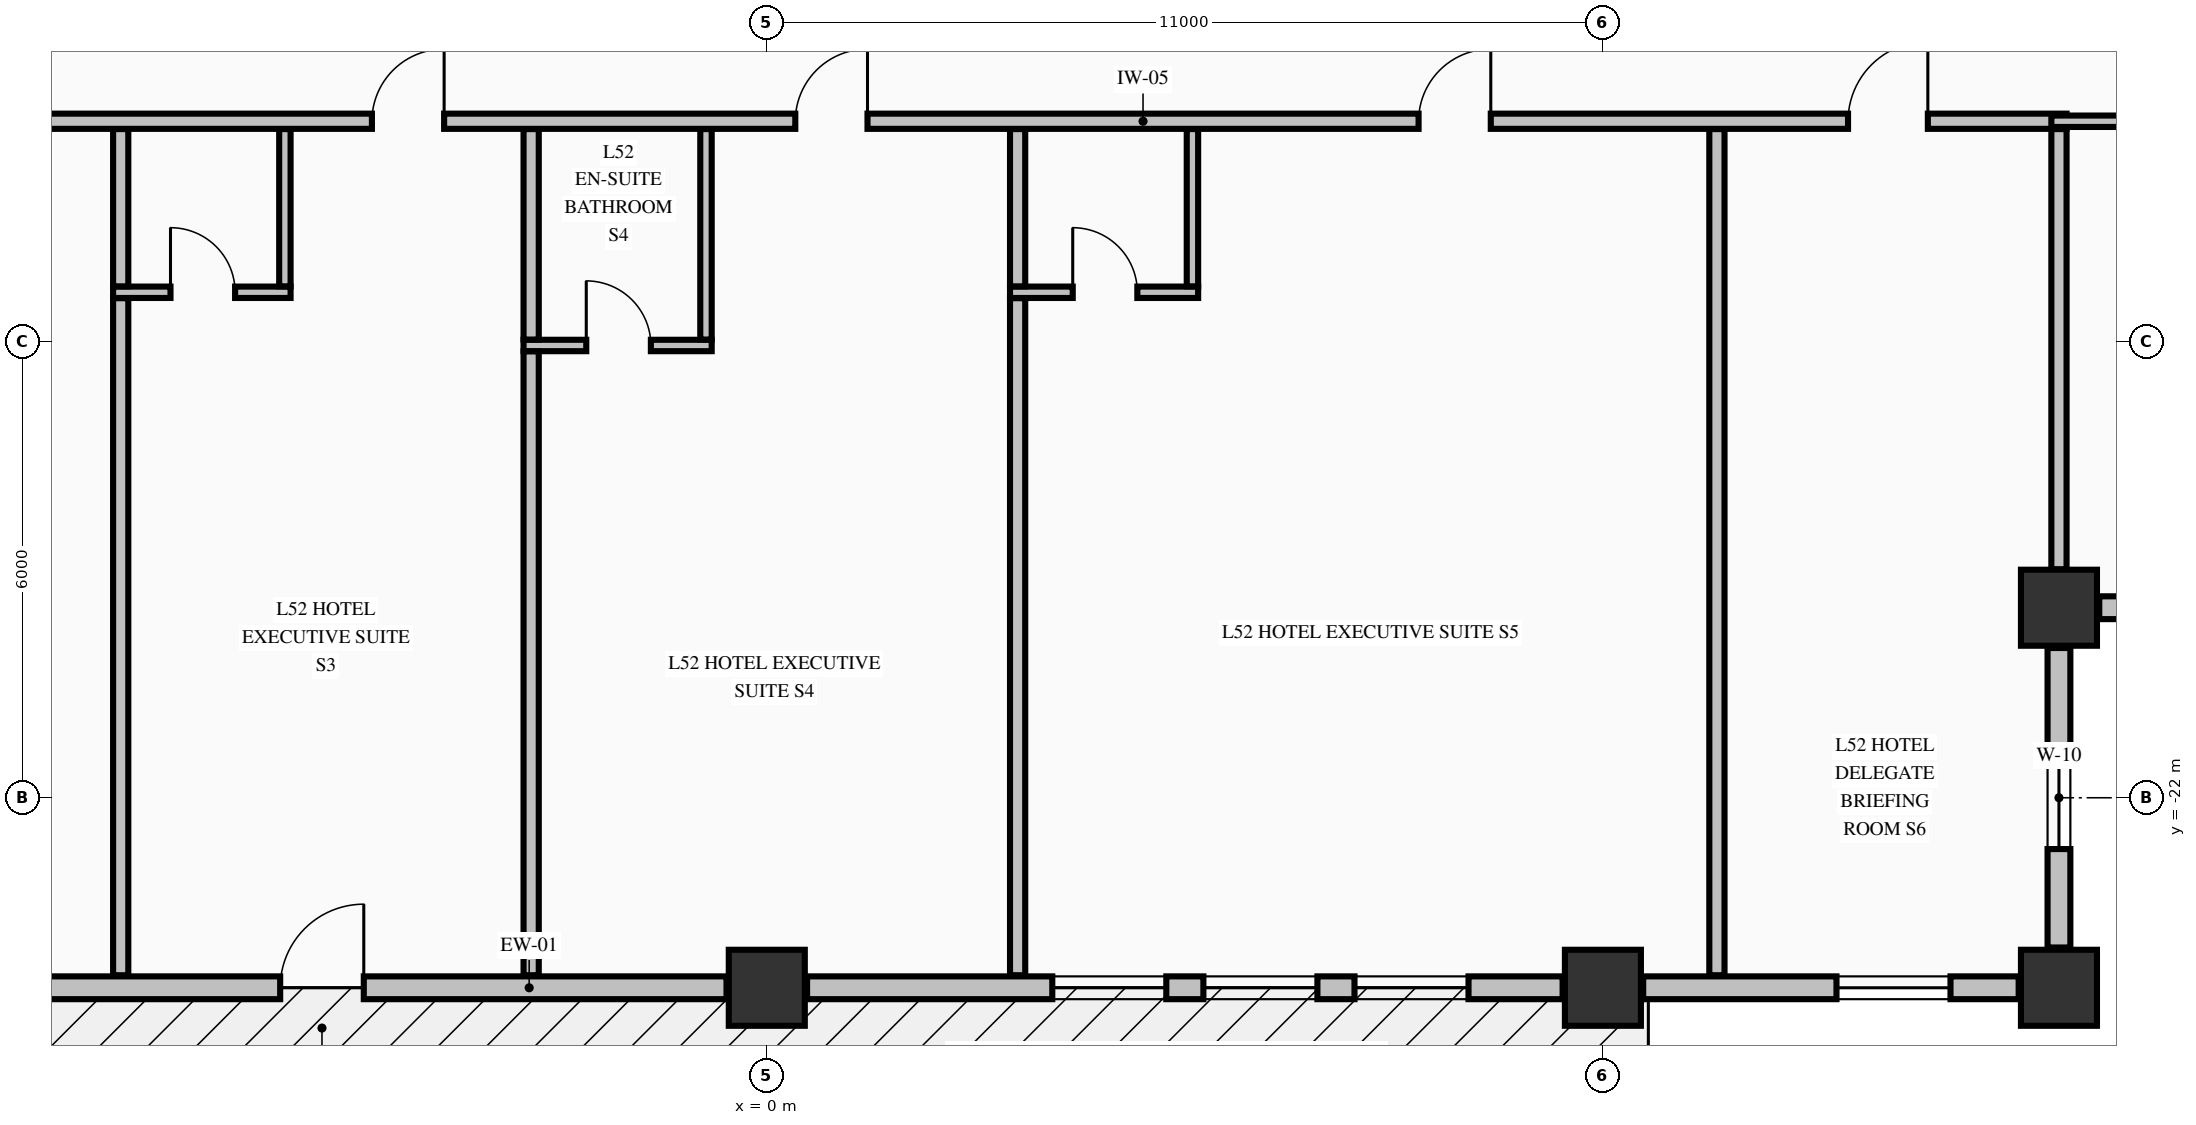
"""IFC4 building model, lengths in metres.
Left out: names, types, materials, properties, quantities, classifications, styles, units other than length and angle.
Written with IfcOpenShell. Run it as: python <this file> out.ifc"""

import sys

from ifc_helpers import new_model, si_unit, direction, frame, frame_2d, origin, origin_2d, place, context, subcontext, project, spatial, rectangle, extrude, element, fill, save


model = new_model("IFC4")
c1 = context("Model", 3, precision=1e-05, world=origin(), true_north=direction((0.0, 1.0)))
c2 = subcontext(c1, "Body", "Model", "MODEL_VIEW")
j1 = project(units=[si_unit("LENGTHUNIT", "METRE"), si_unit("PLANEANGLEUNIT", "RADIAN")], contexts=[c1])
p1 = place(None, origin())
s1 = spatial("IfcSite", under=j1, at=p1, CompositionType="ELEMENT")
p2 = place(p1, origin())
s2 = spatial("IfcBuilding", under=s1, at=p2, CompositionType="ELEMENT")
p3 = place(p2, frame((0.0, 0.0, 201.66)))
s3 = spatial("IfcBuildingStorey", under=s2, at=p3, CompositionType="ELEMENT", Elevation=201.66)
for number, where, z_axis, x_axis in (
    (1, (0.0, -24.5, -0.25), (0.0, 0.0, 1.0), (1.0, 0.0, 0.0)),
    (2, (11.0, -24.5, -0.25), (0.0, 0.0, 1.0), (1.0, 0.0, 0.0)),
    (3, (17.0, -24.5, -0.25), (0.0, 0.0, 1.0), (1.0, 0.0, 0.0)),
    (4, (17.0, -19.5, -0.25), (0.0, 0.0, 1.0), (1.0, 0.0, 0.0)),
):
    element("IfcColumn", number, at=place(p3, frame(where, z_axis=z_axis, x_axis=x_axis)), inside=s3, PredefinedType="COLUMN", context=c2, shape_type="SweptSolid", body=[
        extrude(rectangle(XDim=1.0, YDim=1.0, at=origin_2d()), origin(), (0.0, 0.0, 1.0), 3.4),
    ])
p4 = place(p3, frame((17.0, -23.97, 0.0), z_axis=(0.0, 0.0, 1.0), x_axis=(0.0, 1.0, 0.0)))
e5 = element("IfcWall", 5, at=p4, inside=s3, PredefinedType="STANDARD", context=c2, shape_type="SweptSolid", body=[
    extrude(rectangle(XDim=3.94, YDim=0.3, at=frame_2d((1.97, 0.0))), origin(), (0.0, 0.0, 1.0), 2.542),
])
p5 = place(p4, frame((1.295, 0.0, 0.68)))
e6 = element("IfcOpeningElement", 6, at=p5, cuts=e5, PredefinedType="OPENING", context=c2, shape_type="SweptSolid", body=[
    extrude(rectangle(XDim=1.35, YDim=1.42, at=frame_2d((0.675, 0.71))), frame((0.0, 0.16, 0.0), z_axis=(0.0, -1.0, 0.0), x_axis=(1.0, 0.0, 0.0)), (0.0, 0.0, 1.0), 0.32),
])
p6 = place(p3, frame((17.53, -19.5, 0.0), z_axis=(0.0, 0.0, 1.0), x_axis=(1.0, 0.0, 0.0)))
e7 = element("IfcWall", 7, at=p6, inside=s3, PredefinedType="STANDARD", context=c2, shape_type="SweptSolid", body=[
    extrude(rectangle(XDim=3.94, YDim=0.3, at=frame_2d((1.97, 0.0))), origin(), (0.0, 0.0, 1.0), 2.542),
])
p7 = place(p6, frame((1.295, 0.0, 0.68)))
e8 = element("IfcOpeningElement", 8, at=p7, cuts=e7, PredefinedType="OPENING", context=c2, shape_type="SweptSolid", body=[
    extrude(rectangle(XDim=1.35, YDim=1.42, at=frame_2d((0.675, 0.71))), frame((0.0, 0.16, 0.0), z_axis=(0.0, -1.0, 0.0), x_axis=(1.0, 0.0, 0.0)), (0.0, 0.0, 1.0), 0.32),
])
p8 = place(p3, frame((-10.47, -24.5, 0.0), z_axis=(0.0, 0.0, 1.0), x_axis=(1.0, 0.0, 0.0)))
e9 = element("IfcWall", 9, at=p8, inside=s3, PredefinedType="STANDARD", context=c2, shape_type="SweptSolid", body=[
    extrude(rectangle(XDim=9.94, YDim=0.3, at=frame_2d((4.97, 0.0))), origin(), (0.0, 0.0, 1.0), 2.542),
])
p9 = place(p8, frame((4.068, 0.0, 0.0)))
e10 = element("IfcOpeningElement", 10, at=p9, cuts=e9, PredefinedType="OPENING", context=c2, shape_type="SweptSolid", body=[
    extrude(rectangle(XDim=1.1, YDim=2.15, at=frame_2d((0.55, 1.075))), frame((0.0, 0.16, 0.0), z_axis=(0.0, -1.0, 0.0), x_axis=(1.0, 0.0, 0.0)), (0.0, 0.0, 1.0), 0.32),
])
p10 = place(p3, frame((0.53, -24.5, 0.0), z_axis=(0.0, 0.0, 1.0), x_axis=(1.0, 0.0, 0.0)))
e11 = element("IfcWall", 11, at=p10, inside=s3, PredefinedType="STANDARD", context=c2, shape_type="SweptSolid", body=[
    extrude(rectangle(XDim=9.94, YDim=0.3, at=frame_2d((4.97, 0.0))), origin(), (0.0, 0.0, 1.0), 2.542),
])
p11 = place(p10, frame((3.226, 0.0, 0.72)))
e12 = element("IfcOpeningElement", 12, at=p11, cuts=e11, PredefinedType="OPENING", context=c2, shape_type="SweptSolid", body=[
    extrude(rectangle(XDim=1.5, YDim=1.6, at=frame_2d((0.75, 0.8))), frame((0.0, 0.16, 0.0), z_axis=(0.0, -1.0, 0.0), x_axis=(1.0, 0.0, 0.0)), (0.0, 0.0, 1.0), 0.32),
])
p12 = place(p10, frame((5.214, 0.0, 0.72)))
e13 = element("IfcOpeningElement", 13, at=p12, cuts=e11, PredefinedType="OPENING", context=c2, shape_type="SweptSolid", body=[
    extrude(rectangle(XDim=1.5, YDim=1.6, at=frame_2d((0.75, 0.8))), frame((0.0, 0.16, 0.0), z_axis=(0.0, -1.0, 0.0), x_axis=(1.0, 0.0, 0.0)), (0.0, 0.0, 1.0), 0.32),
])
p13 = place(p10, frame((7.202, 0.0, 0.72)))
e14 = element("IfcOpeningElement", 14, at=p13, cuts=e11, PredefinedType="OPENING", context=c2, shape_type="SweptSolid", body=[
    extrude(rectangle(XDim=1.5, YDim=1.6, at=frame_2d((0.75, 0.8))), frame((0.0, 0.16, 0.0), z_axis=(0.0, -1.0, 0.0), x_axis=(1.0, 0.0, 0.0)), (0.0, 0.0, 1.0), 0.32),
])
p14 = place(p3, frame((11.53, -24.5, 0.0), z_axis=(0.0, 0.0, 1.0), x_axis=(1.0, 0.0, 0.0)))
e15 = element("IfcWall", 15, at=p14, inside=s3, PredefinedType="STANDARD", context=c2, shape_type="SweptSolid", body=[
    extrude(rectangle(XDim=4.94, YDim=0.3, at=frame_2d((2.47, 0.0))), origin(), (0.0, 0.0, 1.0), 2.542),
])
p15 = place(p14, frame((2.543, 0.0, 0.72)))
e16 = element("IfcOpeningElement", 16, at=p15, cuts=e15, PredefinedType="OPENING", context=c2, shape_type="SweptSolid", body=[
    extrude(rectangle(XDim=1.5, YDim=1.6, at=frame_2d((0.75, 0.8))), frame((0.0, 0.16, 0.0), z_axis=(0.0, -1.0, 0.0), x_axis=(1.0, 0.0, 0.0)), (0.0, 0.0, 1.0), 0.32),
])
p16 = place(p3, frame((-3.2, -16.05, 0.0), z_axis=(0.0, 0.0, 1.0), x_axis=(1.0, 0.0, 0.0)))
e17 = element("IfcWall", 17, at=p16, inside=s3, PredefinedType="PARTITIONING", context=c2, shape_type="SweptSolid", body=[
    extrude(rectangle(XDim=2.475, YDim=0.15, at=frame_2d((1.237, 0.0))), origin(), (0.0, 0.0, 1.0), 3.15),
])
p17 = place(p16, frame((0.825, 0.0, 0.0)))
e18 = element("IfcOpeningElement", 18, at=p17, cuts=e17, PredefinedType="OPENING", context=c2, shape_type="SweptSolid", body=[
    extrude(rectangle(XDim=0.85, YDim=2.1, at=frame_2d((0.425, 1.05))), frame((0.0, 0.085, 0.0), z_axis=(0.0, -1.0, 0.0), x_axis=(1.0, 0.0, 0.0)), (0.0, 0.0, 1.0), 0.17),
])
p18 = place(p3, frame((-8.6, -15.35, 0.0), z_axis=(0.0, 0.0, 1.0), x_axis=(1.0, 0.0, 0.0)))
e19 = element("IfcWall", 19, at=p18, inside=s3, PredefinedType="PARTITIONING", context=c2, shape_type="SweptSolid", body=[
    extrude(rectangle(XDim=2.335, YDim=0.15, at=frame_2d((1.167, 0.0))), origin(), (0.0, 0.0, 1.0), 3.15),
])
p19 = place(p18, frame((0.755, 0.0, 0.0)))
e20 = element("IfcOpeningElement", 20, at=p19, cuts=e19, PredefinedType="OPENING", context=c2, shape_type="SweptSolid", body=[
    extrude(rectangle(XDim=0.85, YDim=2.1, at=frame_2d((0.425, 1.05))), frame((0.0, 0.085, 0.0), z_axis=(0.0, -1.0, 0.0), x_axis=(1.0, 0.0, 0.0)), (0.0, 0.0, 1.0), 0.17),
])
p20 = place(p3, frame((3.2, -15.35, 0.0), z_axis=(0.0, 0.0, 1.0), x_axis=(1.0, 0.0, 0.0)))
e21 = element("IfcWall", 21, at=p20, inside=s3, PredefinedType="PARTITIONING", context=c2, shape_type="SweptSolid", body=[
    extrude(rectangle(XDim=2.475, YDim=0.15, at=frame_2d((1.238, 0.0))), origin(), (0.0, 0.0, 1.0), 3.15),
])
p21 = place(p20, frame((0.825, 0.0, 0.0)))
e22 = element("IfcOpeningElement", 22, at=p21, cuts=e21, PredefinedType="OPENING", context=c2, shape_type="SweptSolid", body=[
    extrude(rectangle(XDim=0.85, YDim=2.1, at=frame_2d((0.425, 1.05))), frame((0.0, 0.085, 0.0), z_axis=(0.0, -1.0, 0.0), x_axis=(1.0, 0.0, 0.0)), (0.0, 0.0, 1.0), 0.17),
])
p22 = place(p3, frame((-22.1, -13.1, 0.0), z_axis=(0.0, 0.0, 1.0), x_axis=(1.0, 0.0, 0.0)))
e23 = element("IfcWall", 23, at=p22, inside=s3, PredefinedType="PARTITIONING", context=c2, shape_type="SweptSolid", body=[
    extrude(rectangle(XDim=39.2, YDim=0.2, at=frame_2d((19.6, 0.0))), origin(), (0.0, 0.0, 1.0), 3.15),
])
p23 = place(p22, frame((4.025, 0.0, 0.0)))
e24 = element("IfcOpeningElement", 24, at=p23, cuts=e23, PredefinedType="OPENING", context=c2, shape_type="SweptSolid", body=[
    extrude(rectangle(XDim=0.95, YDim=2.15, at=frame_2d((0.475, 1.075))), frame((0.0, 0.11, 0.0), z_axis=(0.0, -1.0, 0.0), x_axis=(1.0, 0.0, 0.0)), (0.0, 0.0, 1.0), 0.22),
])
p24 = place(p22, frame((10.075, 0.0, 0.0)))
e25 = element("IfcOpeningElement", 25, at=p24, cuts=e23, PredefinedType="OPENING", context=c2, shape_type="SweptSolid", body=[
    extrude(rectangle(XDim=0.95, YDim=2.15, at=frame_2d((0.475, 1.075))), frame((0.0, 0.11, 0.0), z_axis=(0.0, -1.0, 0.0), x_axis=(1.0, 0.0, 0.0)), (0.0, 0.0, 1.0), 0.22),
])
p25 = place(p22, frame((16.905, 0.0, 0.0)))
e26 = element("IfcOpeningElement", 26, at=p25, cuts=e23, PredefinedType="OPENING", context=c2, shape_type="SweptSolid", body=[
    extrude(rectangle(XDim=0.95, YDim=2.15, at=frame_2d((0.475, 1.075))), frame((0.0, 0.11, 0.0), z_axis=(0.0, -1.0, 0.0), x_axis=(1.0, 0.0, 0.0)), (0.0, 0.0, 1.0), 0.22),
])
p26 = place(p22, frame((22.475, 0.0, 0.0)))
e27 = element("IfcOpeningElement", 27, at=p26, cuts=e23, PredefinedType="OPENING", context=c2, shape_type="SweptSolid", body=[
    extrude(rectangle(XDim=0.95, YDim=2.15, at=frame_2d((0.475, 1.075))), frame((0.0, 0.11, 0.0), z_axis=(0.0, -1.0, 0.0), x_axis=(1.0, 0.0, 0.0)), (0.0, 0.0, 1.0), 0.22),
])
p27 = place(p22, frame((30.675, 0.0, 0.0)))
e28 = element("IfcOpeningElement", 28, at=p27, cuts=e23, PredefinedType="OPENING", context=c2, shape_type="SweptSolid", body=[
    extrude(rectangle(XDim=0.95, YDim=2.15, at=frame_2d((0.475, 1.075))), frame((0.0, 0.11, 0.0), z_axis=(0.0, -1.0, 0.0), x_axis=(1.0, 0.0, 0.0)), (0.0, 0.0, 1.0), 0.22),
])
p28 = place(p22, frame((36.325, 0.0, 0.0)))
e29 = element("IfcOpeningElement", 29, at=p28, cuts=e23, PredefinedType="OPENING", context=c2, shape_type="SweptSolid", body=[
    extrude(rectangle(XDim=1.05, YDim=2.15, at=frame_2d((0.525, 1.075))), frame((0.0, 0.11, 0.0), z_axis=(0.0, -1.0, 0.0), x_axis=(1.0, 0.0, 0.0)), (0.0, 0.0, 1.0), 0.22),
])
p29 = place(p3, frame((16.9, -13.1, 0.0), z_axis=(0.0, 0.0, 1.0), x_axis=(1.0, 0.0, 0.0)))
e30 = element("IfcWall", 30, at=p29, inside=s3, PredefinedType="PARTITIONING", context=c2, shape_type="SweptSolid", body=[
    extrude(rectangle(XDim=3.175, YDim=0.15, at=frame_2d((1.587, 0.0))), origin(), (0.0, 0.0, 1.0), 3.15),
])
p30 = place(p3, frame((-8.5, -24.335, 0.0), z_axis=(0.0, 0.0, 1.0), x_axis=(0.0, 1.0, 0.0)))
e31 = element("IfcWall", 31, at=p30, inside=s3, PredefinedType="PARTITIONING", context=c2, shape_type="SweptSolid", body=[
    extrude(rectangle(XDim=8.907, YDim=0.2, at=frame_2d((4.454, 0.0))), origin(), (0.0, 0.0, 1.0), 3.15),
])
p31 = place(p3, frame((-8.5, -15.272, 0.0), z_axis=(0.0, 0.0, 1.0), x_axis=(0.0, 1.0, 0.0)))
e32 = element("IfcWall", 32, at=p31, inside=s3, PredefinedType="PARTITIONING", context=c2, shape_type="SweptSolid", body=[
    extrude(rectangle(XDim=2.069, YDim=0.2, at=frame_2d((1.035, 0.0))), origin(), (0.0, 0.0, 1.0), 3.15),
])
p32 = place(p3, frame((-6.34, -15.272, 0.0), z_axis=(0.0, 0.0, 1.0), x_axis=(0.0, 1.0, 0.0)))
e33 = element("IfcWall", 33, at=p32, inside=s3, PredefinedType="PARTITIONING", context=c2, shape_type="SweptSolid", body=[
    extrude(rectangle(XDim=2.069, YDim=0.15, at=frame_2d((1.035, 0.0))), origin(), (0.0, 0.0, 1.0), 3.15),
])
p33 = place(p3, frame((-3.1, -24.335, 0.0), z_axis=(0.0, 0.0, 1.0), x_axis=(0.0, 1.0, 0.0)))
e34 = element("IfcWall", 34, at=p33, inside=s3, PredefinedType="PARTITIONING", context=c2, shape_type="SweptSolid", body=[
    extrude(rectangle(XDim=8.207, YDim=0.2, at=frame_2d((4.104, 0.0))), origin(), (0.0, 0.0, 1.0), 3.15),
])
p34 = place(p3, frame((-3.1, -15.972, 0.0), z_axis=(0.0, 0.0, 1.0), x_axis=(0.0, 1.0, 0.0)))
e35 = element("IfcWall", 35, at=p34, inside=s3, PredefinedType="PARTITIONING", context=c2, shape_type="SweptSolid", body=[
    extrude(rectangle(XDim=2.769, YDim=0.2, at=frame_2d((1.385, 0.0))), origin(), (0.0, 0.0, 1.0), 3.15),
])
p35 = place(p3, frame((-0.8, -15.972, 0.0), z_axis=(0.0, 0.0, 1.0), x_axis=(0.0, 1.0, 0.0)))
e36 = element("IfcWall", 36, at=p35, inside=s3, PredefinedType="PARTITIONING", context=c2, shape_type="SweptSolid", body=[
    extrude(rectangle(XDim=2.769, YDim=0.15, at=frame_2d((1.385, 0.0))), origin(), (0.0, 0.0, 1.0), 3.15),
])
p36 = place(p3, frame((3.3, -24.335, 0.0), z_axis=(0.0, 0.0, 1.0), x_axis=(0.0, 1.0, 0.0)))
e37 = element("IfcWall", 37, at=p36, inside=s3, PredefinedType="PARTITIONING", context=c2, shape_type="SweptSolid", body=[
    extrude(rectangle(XDim=8.907, YDim=0.2, at=frame_2d((4.454, 0.0))), origin(), (0.0, 0.0, 1.0), 3.15),
])
p37 = place(p3, frame((3.3, -15.272, 0.0), z_axis=(0.0, 0.0, 1.0), x_axis=(0.0, 1.0, 0.0)))
e38 = element("IfcWall", 38, at=p37, inside=s3, PredefinedType="PARTITIONING", context=c2, shape_type="SweptSolid", body=[
    extrude(rectangle(XDim=2.069, YDim=0.2, at=frame_2d((1.035, 0.0))), origin(), (0.0, 0.0, 1.0), 3.15),
])
p38 = place(p3, frame((5.6, -15.272, 0.0), z_axis=(0.0, 0.0, 1.0), x_axis=(0.0, 1.0, 0.0)))
e39 = element("IfcWall", 39, at=p38, inside=s3, PredefinedType="PARTITIONING", context=c2, shape_type="SweptSolid", body=[
    extrude(rectangle(XDim=2.069, YDim=0.15, at=frame_2d((1.035, 0.0))), origin(), (0.0, 0.0, 1.0), 3.15),
])
p39 = place(p3, frame((12.5, -24.335, 0.0), z_axis=(0.0, 0.0, 1.0), x_axis=(0.0, 1.0, 0.0)))
e40 = element("IfcWall", 40, at=p39, inside=s3, PredefinedType="PARTITIONING", context=c2, shape_type="SweptSolid", body=[
    extrude(rectangle(XDim=11.132, YDim=0.2, at=frame_2d((5.566, 0.0))), origin(), (0.0, 0.0, 1.0), 3.15),
])
p40 = place(p3, frame((17.0, -18.994, 0.0), z_axis=(0.0, 0.0, 1.0), x_axis=(0.0, 1.0, 0.0)))
e41 = element("IfcWall", 41, at=p40, inside=s3, PredefinedType="PARTITIONING", context=c2, shape_type="SweptSolid", body=[
    extrude(rectangle(XDim=5.791, YDim=0.2, at=frame_2d((2.896, 0.0))), origin(), (0.0, 0.0, 1.0), 3.15),
])
p41 = place(p5, origin())
e42 = element("IfcWindow", 42, at=p41, inside=s3, PartitioningType="SINGLE_PANEL", PredefinedType="WINDOW", context=c2, shape_type="SweptSolid", body=[
    extrude(rectangle(XDim=1.35, YDim=1.42, at=frame_2d((0.675, 0.71))), frame((0.0, 0.03, 0.0), z_axis=(0.0, -1.0, 0.0), x_axis=(1.0, 0.0, 0.0)), (0.0, 0.0, 1.0), 0.06),
])
fill(e6, e42)
p42 = place(p9, origin())
e43 = element("IfcDoor", 43, at=p42, inside=s3, OperationType="SINGLE_SWING_RIGHT", PredefinedType="DOOR", context=c2, shape_type="SweptSolid", body=[
    extrude(rectangle(XDim=1.1, YDim=2.15, at=frame_2d((0.55, 1.075))), frame((0.0, 0.025, 0.0), z_axis=(0.0, -1.0, 0.0), x_axis=(1.0, 0.0, 0.0)), (0.0, 0.0, 1.0), 0.05),
])
fill(e10, e43)
p43 = place(p11, origin())
e44 = element("IfcWindow", 44, at=p43, inside=s3, PartitioningType="SINGLE_PANEL", PredefinedType="WINDOW", context=c2, shape_type="SweptSolid", body=[
    extrude(rectangle(XDim=1.5, YDim=1.6, at=frame_2d((0.75, 0.8))), frame((0.0, 0.03, 0.0), z_axis=(0.0, -1.0, 0.0), x_axis=(1.0, 0.0, 0.0)), (0.0, 0.0, 1.0), 0.06),
])
fill(e12, e44)
p44 = place(p12, origin())
e45 = element("IfcWindow", 45, at=p44, inside=s3, PartitioningType="SINGLE_PANEL", PredefinedType="WINDOW", context=c2, shape_type="SweptSolid", body=[
    extrude(rectangle(XDim=1.5, YDim=1.6, at=frame_2d((0.75, 0.8))), frame((0.0, 0.03, 0.0), z_axis=(0.0, -1.0, 0.0), x_axis=(1.0, 0.0, 0.0)), (0.0, 0.0, 1.0), 0.06),
])
fill(e13, e45)
p45 = place(p13, origin())
e46 = element("IfcWindow", 46, at=p45, inside=s3, PartitioningType="SINGLE_PANEL", PredefinedType="WINDOW", context=c2, shape_type="SweptSolid", body=[
    extrude(rectangle(XDim=1.5, YDim=1.6, at=frame_2d((0.75, 0.8))), frame((0.0, 0.03, 0.0), z_axis=(0.0, -1.0, 0.0), x_axis=(1.0, 0.0, 0.0)), (0.0, 0.0, 1.0), 0.06),
])
fill(e14, e46)
p46 = place(p15, origin())
e47 = element("IfcWindow", 47, at=p46, inside=s3, PartitioningType="SINGLE_PANEL", PredefinedType="WINDOW", context=c2, shape_type="SweptSolid", body=[
    extrude(rectangle(XDim=1.5, YDim=1.6, at=frame_2d((0.75, 0.8))), frame((0.0, 0.03, 0.0), z_axis=(0.0, -1.0, 0.0), x_axis=(1.0, 0.0, 0.0)), (0.0, 0.0, 1.0), 0.06),
])
fill(e16, e47)
p47 = place(p25, origin())
e48 = element("IfcDoor", 48, at=p47, inside=s3, OperationType="SINGLE_SWING_RIGHT", PredefinedType="DOOR", context=c2, shape_type="SweptSolid", body=[
    extrude(rectangle(XDim=0.95, YDim=2.15, at=frame_2d((0.475, 1.075))), frame((0.0, 0.025, 0.0), z_axis=(0.0, -1.0, 0.0), x_axis=(1.0, 0.0, 0.0)), (0.0, 0.0, 1.0), 0.05),
])
fill(e26, e48)
p48 = place(p19, origin())
e49 = element("IfcDoor", 49, at=p48, inside=s3, OperationType="SINGLE_SWING_LEFT", PredefinedType="DOOR", context=c2, shape_type="SweptSolid", body=[
    extrude(rectangle(XDim=0.85, YDim=2.1, at=frame_2d((0.425, 1.05))), frame((0.0, 0.025, 0.0), z_axis=(0.0, -1.0, 0.0), x_axis=(1.0, 0.0, 0.0)), (0.0, 0.0, 1.0), 0.05),
])
fill(e20, e49)
p49 = place(p26, origin())
e50 = element("IfcDoor", 50, at=p49, inside=s3, OperationType="SINGLE_SWING_RIGHT", PredefinedType="DOOR", context=c2, shape_type="SweptSolid", body=[
    extrude(rectangle(XDim=0.95, YDim=2.15, at=frame_2d((0.475, 1.075))), frame((0.0, 0.025, 0.0), z_axis=(0.0, -1.0, 0.0), x_axis=(1.0, 0.0, 0.0)), (0.0, 0.0, 1.0), 0.05),
])
fill(e27, e50)
p50 = place(p17, origin())
e51 = element("IfcDoor", 51, at=p50, inside=s3, OperationType="SINGLE_SWING_LEFT", PredefinedType="DOOR", context=c2, shape_type="SweptSolid", body=[
    extrude(rectangle(XDim=0.85, YDim=2.1, at=frame_2d((0.425, 1.05))), frame((0.0, 0.025, 0.0), z_axis=(0.0, -1.0, 0.0), x_axis=(1.0, 0.0, 0.0)), (0.0, 0.0, 1.0), 0.05),
])
fill(e18, e51)
p51 = place(p27, origin())
e52 = element("IfcDoor", 52, at=p51, inside=s3, OperationType="SINGLE_SWING_RIGHT", PredefinedType="DOOR", context=c2, shape_type="SweptSolid", body=[
    extrude(rectangle(XDim=0.95, YDim=2.15, at=frame_2d((0.475, 1.075))), frame((0.0, 0.025, 0.0), z_axis=(0.0, -1.0, 0.0), x_axis=(1.0, 0.0, 0.0)), (0.0, 0.0, 1.0), 0.05),
])
fill(e28, e52)
p52 = place(p21, origin())
e53 = element("IfcDoor", 53, at=p52, inside=s3, OperationType="SINGLE_SWING_LEFT", PredefinedType="DOOR", context=c2, shape_type="SweptSolid", body=[
    extrude(rectangle(XDim=0.85, YDim=2.1, at=frame_2d((0.425, 1.05))), frame((0.0, 0.025, 0.0), z_axis=(0.0, -1.0, 0.0), x_axis=(1.0, 0.0, 0.0)), (0.0, 0.0, 1.0), 0.05),
])
fill(e22, e53)
p53 = place(p28, origin())
e54 = element("IfcDoor", 54, at=p53, inside=s3, OperationType="SINGLE_SWING_RIGHT", PredefinedType="DOOR", context=c2, shape_type="SweptSolid", body=[
    extrude(rectangle(XDim=1.05, YDim=2.15, at=frame_2d((0.525, 1.075))), frame((0.0, 0.025, 0.0), z_axis=(0.0, -1.0, 0.0), x_axis=(1.0, 0.0, 0.0)), (0.0, 0.0, 1.0), 0.05),
])
fill(e29, e54)
save(model, sys.argv[1])
